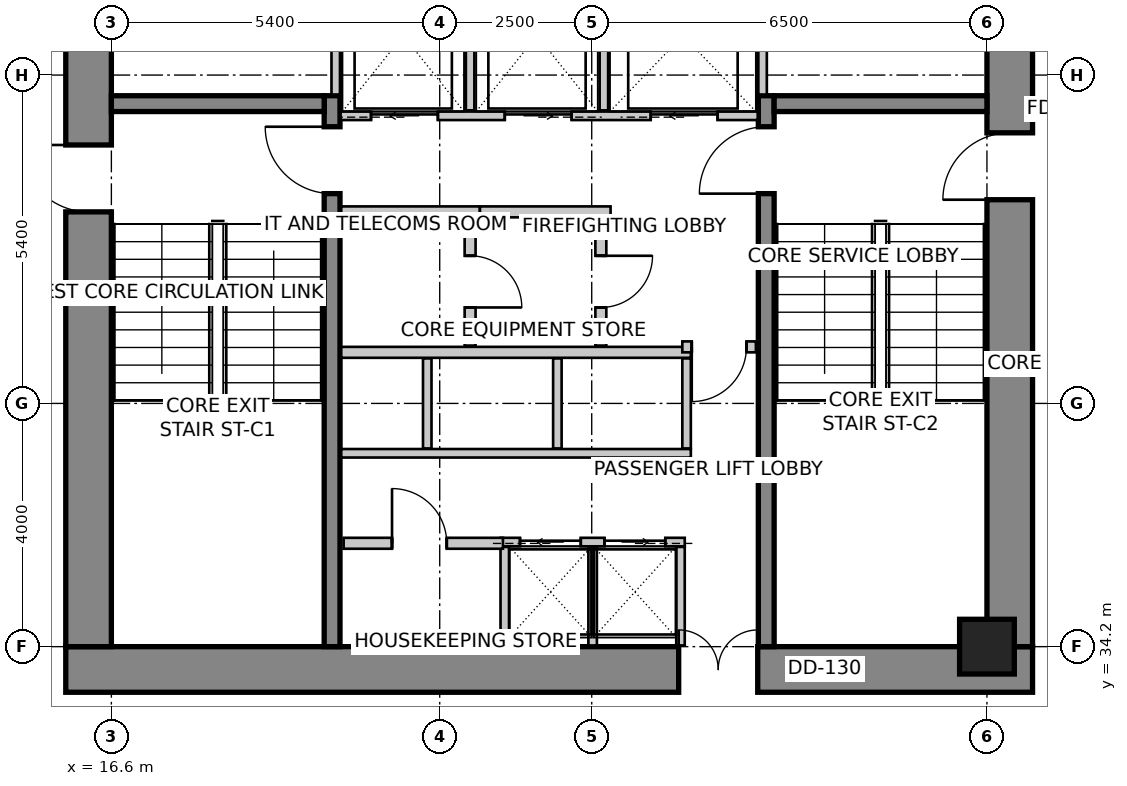
"""IFC4 building model, lengths in metres.
Left out: names, types, materials, properties, quantities, classifications, styles, units other than length and angle.
Written with IfcOpenShell. Run it as: python <this file> out.ifc"""

import sys

from ifc_helpers import new_model, si_unit, direction, frame, frame_2d, origin, origin_2d, place, context, subcontext, project, spatial, rectangle, extrude, source, transform, mapped, element, fill, save


model = new_model("IFC4")
c1 = context("Model", 3, precision=1e-05, world=origin(), true_north=direction((0.0, 1.0)))
c2 = subcontext(c1, "Body", "Model", "MODEL_VIEW")
j1 = project(units=[si_unit("LENGTHUNIT", "METRE"), si_unit("PLANEANGLEUNIT", "RADIAN")], contexts=[c1])
p1 = place(None, origin())
s1 = spatial("IfcSite", under=j1, at=p1, CompositionType="ELEMENT")
p2 = place(p1, origin())
s2 = spatial("IfcBuilding", under=s1, at=p2, CompositionType="ELEMENT")
p3 = place(p2, frame((0.0, 0.0, 157.4)))
s3 = spatial("IfcBuildingStorey", under=s2, at=p3, CompositionType="ELEMENT", Elevation=157.4)
p4 = place(p3, frame((15.85, 33.825, 0.0), z_axis=(0.0, 0.0, 1.0), x_axis=(1.0, 0.0, 0.0)))
e1 = element("IfcWall", 1, at=p4, inside=s3, PredefinedType="SHEAR", context=c2, shape_type="SweptSolid", body=[
    extrude(rectangle(XDim=15.9, YDim=0.75, at=frame_2d((7.95, 0.0))), origin(), (0.0, 0.0, 1.0), 3.6),
])
m1 = source(origin(), c2, "Body", "SweptSolid", [
    extrude(rectangle(XDim=1.3, YDim=2.15, at=frame_2d((0.65, 1.075))), frame((0.0, 0.385, 0.0), z_axis=(0.0, -1.0, 0.0), x_axis=(1.0, 0.0, 0.0)), (0.0, 0.0, 1.0), 0.77),
])
p5 = place(p4, frame((10.08, 0.0, 0.0)))
e2 = element("IfcOpeningElement", 2, at=p5, cuts=e1, PredefinedType="OPENING", context=c2, shape_type="MappedRepresentation", body=[
    mapped(m1, transform((0.0, 0.0, 0.0), scale=1.0)),
])
p6 = place(p3, frame((16.225, 34.2, 0.0), z_axis=(0.0, 0.0, 1.0), x_axis=(0.0, 1.0, 0.0)))
e3 = element("IfcWall", 3, at=p6, inside=s3, PredefinedType="SHEAR", context=c2, shape_type="SweptSolid", body=[
    extrude(rectangle(XDim=11.4, YDim=0.75, at=frame_2d((5.7, 0.0))), origin(), (0.0, 0.0, 1.0), 3.6),
])
m2 = source(origin(), c2, "Body", "SweptSolid", [
    extrude(rectangle(XDim=1.1, YDim=2.15, at=frame_2d((0.55, 1.075))), frame((0.0, 0.385, 0.0), z_axis=(0.0, -1.0, 0.0), x_axis=(1.0, 0.0, 0.0)), (0.0, 0.0, 1.0), 0.77),
])
p7 = place(p6, frame((7.15, 0.0, 0.0)))
e4 = element("IfcOpeningElement", 4, at=p7, cuts=e3, PredefinedType="OPENING", context=c2, shape_type="MappedRepresentation", body=[
    mapped(m2, transform((0.0, 0.0, 0.0), scale=1.0)),
])
p8 = place(p3, frame((31.375, 34.2, 0.0), z_axis=(0.0, 0.0, 1.0), x_axis=(0.0, 1.0, 0.0)))
e5 = element("IfcWall", 5, at=p8, inside=s3, PredefinedType="SHEAR", context=c2, shape_type="SweptSolid", body=[
    extrude(rectangle(XDim=11.4, YDim=0.75, at=frame_2d((5.7, 0.0))), origin(), (0.0, 0.0, 1.0), 3.6),
])
p9 = place(p8, frame((7.35, 0.0, 0.0)))
e6 = element("IfcOpeningElement", 6, at=p9, cuts=e5, PredefinedType="OPENING", context=c2, shape_type="MappedRepresentation", body=[
    mapped(m2, transform((0.0, 0.0, 0.0), scale=1.0)),
])
p10 = place(p3, frame((20.23, 34.2, 0.0), z_axis=(0.0, 0.0, 1.0), x_axis=(0.0, 1.0, 0.0)))
e7 = element("IfcWall", 7, at=p10, inside=s3, PredefinedType="SHEAR", context=c2, shape_type="SweptSolid", body=[
    extrude(rectangle(XDim=9.06, YDim=0.26, at=frame_2d((4.53, 0.0))), origin(), (0.0, 0.0, 1.0), 3.6),
])
m3 = source(origin(), c2, "Body", "SweptSolid", [
    extrude(rectangle(XDim=1.1, YDim=2.15, at=frame_2d((0.55, 1.075))), frame((0.0, 0.14, 0.0), z_axis=(0.0, -1.0, 0.0), x_axis=(1.0, 0.0, 0.0)), (0.0, 0.0, 1.0), 0.28),
])
p11 = place(p10, frame((7.45, 0.0, 0.0)))
e8 = element("IfcOpeningElement", 8, at=p11, cuts=e7, PredefinedType="OPENING", context=c2, shape_type="MappedRepresentation", body=[
    mapped(m3, transform((0.0, 0.0, 0.0), scale=1.0)),
])
p12 = place(p3, frame((27.37, 34.2, 0.0), z_axis=(0.0, 0.0, 1.0), x_axis=(0.0, 1.0, 0.0)))
e9 = element("IfcWall", 9, at=p12, inside=s3, PredefinedType="SHEAR", context=c2, shape_type="SweptSolid", body=[
    extrude(rectangle(XDim=9.06, YDim=0.26, at=frame_2d((4.53, 0.0))), origin(), (0.0, 0.0, 1.0), 3.6),
])
p13 = place(p12, frame((7.45, 0.0, 0.0)))
e10 = element("IfcOpeningElement", 10, at=p13, cuts=e9, PredefinedType="OPENING", context=c2, shape_type="MappedRepresentation", body=[
    mapped(m3, transform((0.0, 0.0, 0.0), scale=1.0)),
])
for number, where, z_axis, x_axis in (
    (11, (16.6, 43.13, 0.0), (0.0, 0.0, 1.0), (1.0, 0.0, 0.0)),
    (12, (27.5, 43.13, 0.0), (0.0, 0.0, 1.0), (1.0, 0.0, 0.0)),
):
    element("IfcWall", number, at=place(p3, frame(where, z_axis=z_axis, x_axis=x_axis)), inside=s3, PredefinedType="SHEAR", context=c2, shape_type="SweptSolid", body=[
        extrude(rectangle(XDim=3.5, YDim=0.26, at=frame_2d((1.75, 0.0))), origin(), (0.0, 0.0, 1.0), 3.6),
    ])
m4 = source(origin(), c2, "Body", "SweptSolid", [
    extrude(rectangle(XDim=0.9, YDim=0.9, at=origin_2d()), origin(), (0.0, 0.0, 1.0), 3.6),
])
p14 = place(p3, frame((31.0, 34.2, 0.0), z_axis=(0.0, 0.0, 1.0), x_axis=(1.0, 0.0, 0.0)))
e13 = element("IfcColumn", 13, at=p14, inside=s3, PredefinedType="COLUMN", context=c2, shape_type="MappedRepresentation", body=[
    mapped(m4, transform((0.0, 0.0, 0.0), scale=1.0)),
])
p15 = place(p3, frame((20.37, 42.93, 0.0), z_axis=(0.0, 0.0, 1.0), x_axis=(1.0, 0.0, 0.0)))
e14 = element("IfcWall", 14, at=p15, inside=s3, PredefinedType="SOLIDWALL", context=c2, shape_type="SweptSolid", body=[
    extrude(rectangle(XDim=6.86, YDim=0.14, at=frame_2d((3.43, 0.0))), origin(), (0.0, 0.0, 1.0), 3.35),
])
m5 = source(origin(), c2, "Body", "SweptSolid", [
    extrude(rectangle(XDim=1.1, YDim=2.15, at=frame_2d((0.55, 1.075))), frame((0.0, 0.08, 0.0), z_axis=(0.0, -1.0, 0.0), x_axis=(1.0, 0.0, 0.0)), (0.0, 0.0, 1.0), 0.16),
])
p16 = place(p15, frame((0.5, 0.0, 0.0)))
e15 = element("IfcOpeningElement", 15, at=p16, cuts=e14, PredefinedType="OPENING", context=c2, shape_type="MappedRepresentation", body=[
    mapped(m5, transform((0.0, 0.0, 0.0), scale=1.0)),
])
p17 = place(p15, frame((2.7, 0.0, 0.0)))
e16 = element("IfcOpeningElement", 16, at=p17, cuts=e14, PredefinedType="OPENING", context=c2, shape_type="MappedRepresentation", body=[
    mapped(m5, transform((0.0, 0.0, 0.0), scale=1.0)),
])
p18 = place(p15, frame((5.1, 0.0, 0.0)))
e17 = element("IfcOpeningElement", 17, at=p18, cuts=e14, PredefinedType="OPENING", context=c2, shape_type="MappedRepresentation", body=[
    mapped(m5, transform((0.0, 0.0, 0.0), scale=1.0)),
])
for number, where, z_axis, x_axis in (
    (18, (20.29, 43.28, 0.0), (0.0, 0.0, 1.0), (0.0, 1.0, 0.0)),
    (19, (27.31, 43.28, 0.0), (0.0, 0.0, 1.0), (0.0, 1.0, 0.0)),
):
    element("IfcWall", number, at=place(p3, frame(where, z_axis=z_axis, x_axis=x_axis)), inside=s3, PredefinedType="SOLIDWALL", context=c2, shape_type="SweptSolid", body=[
        extrude(rectangle(XDim=2.3, YDim=0.14, at=frame_2d((1.15, 0.0))), origin(), (0.0, 0.0, 1.0), 3.35),
    ])
for number, where, z_axis, x_axis in (
    (20, (22.5, 43.02, 0.0), (0.0, 0.0, 1.0), (0.0, 1.0, 0.0)),
    (21, (24.7, 43.02, 0.0), (0.0, 0.0, 1.0), (0.0, 1.0, 0.0)),
):
    element("IfcWall", number, at=place(p3, frame(where, z_axis=z_axis, x_axis=x_axis)), inside=s3, PredefinedType="SOLIDWALL", context=c2, shape_type="SweptSolid", body=[
        extrude(rectangle(XDim=2.56, YDim=0.14, at=frame_2d((1.28, 0.0))), origin(), (0.0, 0.0, 1.0), 3.35),
    ])
p19 = place(p3, frame((23.0, 35.92, 0.0), z_axis=(0.0, 0.0, 1.0), x_axis=(1.0, 0.0, 0.0)))
e22 = element("IfcWall", 22, at=p19, inside=s3, PredefinedType="SOLIDWALL", context=c2, shape_type="SweptSolid", body=[
    extrude(rectangle(XDim=3.03, YDim=0.14, at=frame_2d((1.515, 0.0))), origin(), (0.0, 0.0, 1.0), 3.35),
])
m6 = source(origin(), c2, "Body", "SweptSolid", [
    extrude(rectangle(XDim=1.0, YDim=2.15, at=frame_2d((0.5, 1.075))), frame((0.0, 0.08, 0.0), z_axis=(0.0, -1.0, 0.0), x_axis=(1.0, 0.0, 0.0)), (0.0, 0.0, 1.0), 0.16),
])
p20 = place(p19, frame((0.32, 0.0, 0.0)))
e23 = element("IfcOpeningElement", 23, at=p20, cuts=e22, PredefinedType="OPENING", context=c2, shape_type="MappedRepresentation", body=[
    mapped(m6, transform((0.0, 0.0, 0.0), scale=1.0)),
])
p21 = place(p19, frame((1.71, 0.0, 0.0)))
e24 = element("IfcOpeningElement", 24, at=p21, cuts=e22, PredefinedType="OPENING", context=c2, shape_type="MappedRepresentation", body=[
    mapped(m6, transform((0.0, 0.0, 0.0), scale=1.0)),
])
for number, where, z_axis, x_axis in (
    (25, (25.96, 34.22, 0.0), (0.0, 0.0, 1.0), (0.0, 1.0, 0.0)),
    (26, (23.07, 34.22, 0.0), (0.0, 0.0, 1.0), (0.0, 1.0, 0.0)),
    (27, (24.515, 34.22, 0.0), (0.0, 0.0, 1.0), (0.0, 1.0, 0.0)),
):
    element("IfcWall", number, at=place(p3, frame(where, z_axis=z_axis, x_axis=x_axis)), inside=s3, PredefinedType="SOLIDWALL", context=c2, shape_type="SweptSolid", body=[
        extrude(rectangle(XDim=1.62, YDim=0.14, at=frame_2d((0.81, 0.0))), origin(), (0.0, 0.0, 1.0), 2.642),
    ])
p22 = place(p3, frame((20.38, 37.38, 0.0), z_axis=(0.0, 0.0, 1.0), x_axis=(1.0, 0.0, 0.0)))
e28 = element("IfcWall", 28, at=p22, inside=s3, PredefinedType="SOLIDWALL", context=c2, shape_type="SweptSolid", body=[
    extrude(rectangle(XDim=5.75, YDim=0.14, at=frame_2d((2.875, 0.0))), origin(), (0.0, 0.0, 1.0), 3.35),
])
p23 = place(p3, frame((20.38, 39.04, 0.0), z_axis=(0.0, 0.0, 1.0), x_axis=(1.0, 0.0, 0.0)))
e29 = element("IfcWall", 29, at=p23, inside=s3, PredefinedType="SOLIDWALL", context=c2, shape_type="SweptSolid", body=[
    extrude(rectangle(XDim=5.75, YDim=0.18, at=frame_2d((2.875, 0.0))), origin(), (0.0, 0.0, 1.0), 3.35),
])
for number, where, z_axis, x_axis in (
    (30, (26.06, 37.46, 0.0), (0.0, 0.0, 1.0), (0.0, 1.0, 0.0)),
    (31, (21.795, 37.46, 0.0), (0.0, 0.0, 1.0), (0.0, 1.0, 0.0)),
    (32, (23.935, 37.46, 0.0), (0.0, 0.0, 1.0), (0.0, 1.0, 0.0)),
):
    element("IfcWall", number, at=place(p3, frame(where, z_axis=z_axis, x_axis=x_axis)), inside=s3, PredefinedType="SOLIDWALL", context=c2, shape_type="SweptSolid", body=[
        extrude(rectangle(XDim=1.48, YDim=0.14, at=frame_2d((0.74, 0.0))), origin(), (0.0, 0.0, 1.0), 3.35),
    ])
p24 = place(p3, frame((22.66, 41.35, 0.0), z_axis=(0.0, 0.0, 1.0), x_axis=(-1.0, 0.0, 0.0)))
e33 = element("IfcWall", 33, at=p24, inside=s3, PredefinedType="PARTITIONING", context=c2, shape_type="SweptSolid", body=[
    extrude(rectangle(XDim=2.28, YDim=0.18, at=frame_2d((1.14, 0.0))), origin(), (0.0, 0.0, 1.0), 3.35),
])
p25 = place(p3, frame((24.81, 41.35, 0.0), z_axis=(0.0, 0.0, 1.0), x_axis=(-1.0, 0.0, 0.0)))
e34 = element("IfcWall", 34, at=p25, inside=s3, PredefinedType="PARTITIONING", context=c2, shape_type="SweptSolid", body=[
    extrude(rectangle(XDim=2.148, YDim=0.18, at=frame_2d((1.074, 0.0))), origin(), (0.0, 0.0, 1.0), 3.35),
])
p26 = place(p3, frame((22.5, 41.256, 0.0), z_axis=(0.0, 0.0, 1.0), x_axis=(0.0, -1.0, 0.0)))
e35 = element("IfcWall", 35, at=p26, inside=s3, PredefinedType="PARTITIONING", context=c2, shape_type="SweptSolid", body=[
    extrude(rectangle(XDim=2.106, YDim=0.18, at=frame_2d((1.053, 0.0))), origin(), (0.0, 0.0, 1.0), 3.35),
])
m7 = source(origin(), c2, "Body", "SweptSolid", [
    extrude(rectangle(XDim=0.85, YDim=2.15, at=frame_2d((0.425, 1.075))), frame((0.0, 0.1, 0.0), z_axis=(0.0, -1.0, 0.0), x_axis=(1.0, 0.0, 0.0)), (0.0, 0.0, 1.0), 0.2),
])
p27 = place(p26, frame((0.628, 0.0, 0.0)))
e36 = element("IfcOpeningElement", 36, at=p27, cuts=e35, PredefinedType="OPENING", context=c2, shape_type="MappedRepresentation", body=[
    mapped(m7, transform((0.0, 0.0, 0.0), scale=1.0)),
])
p28 = place(p3, frame((24.65, 41.256, 0.0), z_axis=(0.0, 0.0, 1.0), x_axis=(0.0, -1.0, 0.0)))
e37 = element("IfcWall", 37, at=p28, inside=s3, PredefinedType="PARTITIONING", context=c2, shape_type="SweptSolid", body=[
    extrude(rectangle(XDim=2.106, YDim=0.18, at=frame_2d((1.053, 0.0))), origin(), (0.0, 0.0, 1.0), 3.35),
])
p29 = place(p28, frame((0.628, 0.0, 0.0)))
e38 = element("IfcOpeningElement", 38, at=p29, cuts=e37, PredefinedType="OPENING", context=c2, shape_type="MappedRepresentation", body=[
    mapped(m7, transform((0.0, 0.0, 0.0), scale=1.0)),
])
p30 = place(p3, frame((27.2, 39.13, 0.0), z_axis=(0.0, 0.0, 1.0), x_axis=(-1.0, 0.0, 0.0)))
e39 = element("IfcWall", 39, at=p30, inside=s3, PredefinedType="PARTITIONING", context=c2, shape_type="SweptSolid", body=[
    extrude(rectangle(XDim=1.21, YDim=0.18, at=frame_2d((0.605, 0.0))), origin(), (0.0, 0.0, 1.0), 3.35),
])
m8 = source(origin(), c2, "Body", "SweptSolid", [
    extrude(rectangle(XDim=0.9, YDim=2.15, at=frame_2d((0.45, 1.075))), frame((0.0, 0.1, 0.0), z_axis=(0.0, -1.0, 0.0), x_axis=(1.0, 0.0, 0.0)), (0.0, 0.0, 1.0), 0.2),
])
p31 = place(p30, frame((0.155, 0.0, 0.0)))
e40 = element("IfcOpeningElement", 40, at=p31, cuts=e39, PredefinedType="OPENING", context=c2, shape_type="MappedRepresentation", body=[
    mapped(m8, transform((0.0, 0.0, 0.0), scale=1.0)),
])
p32 = place(p3, frame((20.42, 35.9, 0.0), z_axis=(0.0, 0.0, 1.0), x_axis=(1.0, 0.0, 0.0)))
e41 = element("IfcWall", 41, at=p32, inside=s3, PredefinedType="PARTITIONING", context=c2, shape_type="SweptSolid", body=[
    extrude(rectangle(XDim=2.62, YDim=0.18, at=frame_2d((1.31, 0.0))), origin(), (0.0, 0.0, 1.0), 3.35),
])
p33 = place(p32, frame((0.796, 0.0, 0.0)))
e42 = element("IfcOpeningElement", 42, at=p33, cuts=e41, PredefinedType="OPENING", context=c2, shape_type="MappedRepresentation", body=[
    mapped(m8, transform((0.0, 0.0, 0.0), scale=1.0)),
])
m9 = source(origin(), c2, "Body", "SweptSolid", [
    extrude(rectangle(XDim=1.1, YDim=2.15, at=frame_2d((0.55, 1.075))), frame((0.0, 0.025, 0.0), z_axis=(0.0, -1.0, 0.0), x_axis=(1.0, 0.0, 0.0)), (0.0, 0.0, 1.0), 0.05),
])
p34 = place(p16, origin())
e43 = element("IfcDoor", 43, at=p34, inside=s3, OperationType="SLIDING_TO_LEFT", PredefinedType="DOOR", context=c2, shape_type="MappedRepresentation", body=[
    mapped(m9, transform((0.0, 0.0, 0.0), scale=1.0)),
])
fill(e15, e43)
p35 = place(p17, origin())
e44 = element("IfcDoor", 44, at=p35, inside=s3, OperationType="SLIDING_TO_RIGHT", PredefinedType="DOOR", context=c2, shape_type="MappedRepresentation", body=[
    mapped(m9, transform((0.0, 0.0, 0.0), scale=1.0)),
])
fill(e16, e44)
m10 = source(origin(), c2, "Body", "SweptSolid", [
    extrude(rectangle(XDim=1.1, YDim=2.15, at=frame_2d((0.55, 1.075))), frame((0.0, 0.025, 0.0), z_axis=(0.0, -1.0, 0.0), x_axis=(1.0, 0.0, 0.0)), (0.0, 0.0, 1.0), 0.05),
])
p36 = place(p18, origin())
e45 = element("IfcDoor", 45, at=p36, inside=s3, OperationType="SLIDING_TO_LEFT", PredefinedType="DOOR", context=c2, shape_type="MappedRepresentation", body=[
    mapped(m10, transform((0.0, 0.0, 0.0), scale=1.0)),
])
fill(e17, e45)
m11 = source(origin(), c2, "Body", "SweptSolid", [
    extrude(rectangle(XDim=1.0, YDim=2.15, at=frame_2d((0.5, 1.075))), frame((0.0, 0.025, 0.0), z_axis=(0.0, -1.0, 0.0), x_axis=(1.0, 0.0, 0.0)), (0.0, 0.0, 1.0), 0.05),
])
p37 = place(p20, origin())
e46 = element("IfcDoor", 46, at=p37, inside=s3, OperationType="SLIDING_TO_LEFT", PredefinedType="DOOR", context=c2, shape_type="MappedRepresentation", body=[
    mapped(m11, transform((0.0, 0.0, 0.0), scale=1.0)),
])
fill(e23, e46)
p38 = place(p21, origin())
e47 = element("IfcDoor", 47, at=p38, inside=s3, OperationType="SLIDING_TO_RIGHT", PredefinedType="DOOR", context=c2, shape_type="MappedRepresentation", body=[
    mapped(m11, transform((0.0, 0.0, 0.0), scale=1.0)),
])
fill(e24, e47)
m12 = source(origin(), c2, "Body", "SweptSolid", [
    extrude(rectangle(XDim=1.1, YDim=2.15, at=frame_2d((0.55, 1.075))), frame((0.0, 0.025, 0.0), z_axis=(0.0, -1.0, 0.0), x_axis=(1.0, 0.0, 0.0)), (0.0, 0.0, 1.0), 0.05),
])
p39 = place(p11, origin())
e48 = element("IfcDoor", 48, at=p39, inside=s3, OperationType="SINGLE_SWING_RIGHT", PredefinedType="DOOR", context=c2, shape_type="MappedRepresentation", body=[
    mapped(m12, transform((0.0, 0.0, 0.0), scale=1.0)),
])
fill(e8, e48)
p40 = place(p13, origin())
e49 = element("IfcDoor", 49, at=p40, inside=s3, OperationType="SINGLE_SWING_LEFT", PredefinedType="DOOR", context=c2, shape_type="MappedRepresentation", body=[
    mapped(m12, transform((0.0, 0.0, 0.0), scale=1.0)),
])
fill(e10, e49)
p41 = place(p7, origin())
e50 = element("IfcDoor", 50, at=p41, inside=s3, OperationType="SINGLE_SWING_RIGHT", PredefinedType="DOOR", context=c2, shape_type="MappedRepresentation", body=[
    mapped(m12, transform((0.0, 0.0, 0.0), scale=1.0)),
])
fill(e4, e50)
p42 = place(p9, origin())
e51 = element("IfcDoor", 51, at=p42, inside=s3, OperationType="SINGLE_SWING_LEFT", PredefinedType="DOOR", context=c2, shape_type="MappedRepresentation", body=[
    mapped(m12, transform((0.0, 0.0, 0.0), scale=1.0)),
])
fill(e6, e51)
m13 = source(origin(), c2, "Body", "SweptSolid", [
    extrude(rectangle(XDim=1.3, YDim=2.15, at=frame_2d((0.65, 1.075))), frame((0.0, 0.025, 0.0), z_axis=(0.0, -1.0, 0.0), x_axis=(1.0, 0.0, 0.0)), (0.0, 0.0, 1.0), 0.05),
])
p43 = place(p5, origin())
e52 = element("IfcDoor", 52, at=p43, inside=s3, OperationType="DOUBLE_DOOR_SINGLE_SWING", PredefinedType="DOOR", context=c2, shape_type="MappedRepresentation", body=[
    mapped(m13, transform((0.0, 0.0, 0.0), scale=1.0)),
])
fill(e2, e52)
m14 = source(origin(), c2, "Body", "SweptSolid", [
    extrude(rectangle(XDim=0.85, YDim=2.15, at=frame_2d((0.425, 1.075))), frame((0.0, 0.025, 0.0), z_axis=(0.0, -1.0, 0.0), x_axis=(1.0, 0.0, 0.0)), (0.0, 0.0, 1.0), 0.05),
])
p44 = place(p27, origin())
e53 = element("IfcDoor", 53, at=p44, inside=s3, OperationType="SINGLE_SWING_RIGHT", PredefinedType="DOOR", context=c2, shape_type="MappedRepresentation", body=[
    mapped(m14, transform((0.0, 0.0, 0.0), scale=1.0)),
])
fill(e36, e53)
p45 = place(p29, origin())
e54 = element("IfcDoor", 54, at=p45, inside=s3, OperationType="SINGLE_SWING_LEFT", PredefinedType="DOOR", context=c2, shape_type="MappedRepresentation", body=[
    mapped(m14, transform((0.0, 0.0, 0.0), scale=1.0)),
])
fill(e38, e54)
m15 = source(origin(), c2, "Body", "SweptSolid", [
    extrude(rectangle(XDim=0.9, YDim=2.15, at=frame_2d((0.45, 1.075))), frame((0.0, 0.025, 0.0), z_axis=(0.0, -1.0, 0.0), x_axis=(1.0, 0.0, 0.0)), (0.0, 0.0, 1.0), 0.05),
])
p46 = place(p31, origin())
e55 = element("IfcDoor", 55, at=p46, inside=s3, OperationType="SINGLE_SWING_RIGHT", PredefinedType="DOOR", context=c2, shape_type="MappedRepresentation", body=[
    mapped(m15, transform((0.0, 0.0, 0.0), scale=1.0)),
])
fill(e40, e55)
p47 = place(p33, origin())
e56 = element("IfcDoor", 56, at=p47, inside=s3, OperationType="SINGLE_SWING_LEFT", PredefinedType="DOOR", context=c2, shape_type="MappedRepresentation", body=[
    mapped(m15, transform((0.0, 0.0, 0.0), scale=1.0)),
])
fill(e42, e56)
save(model, sys.argv[1])
